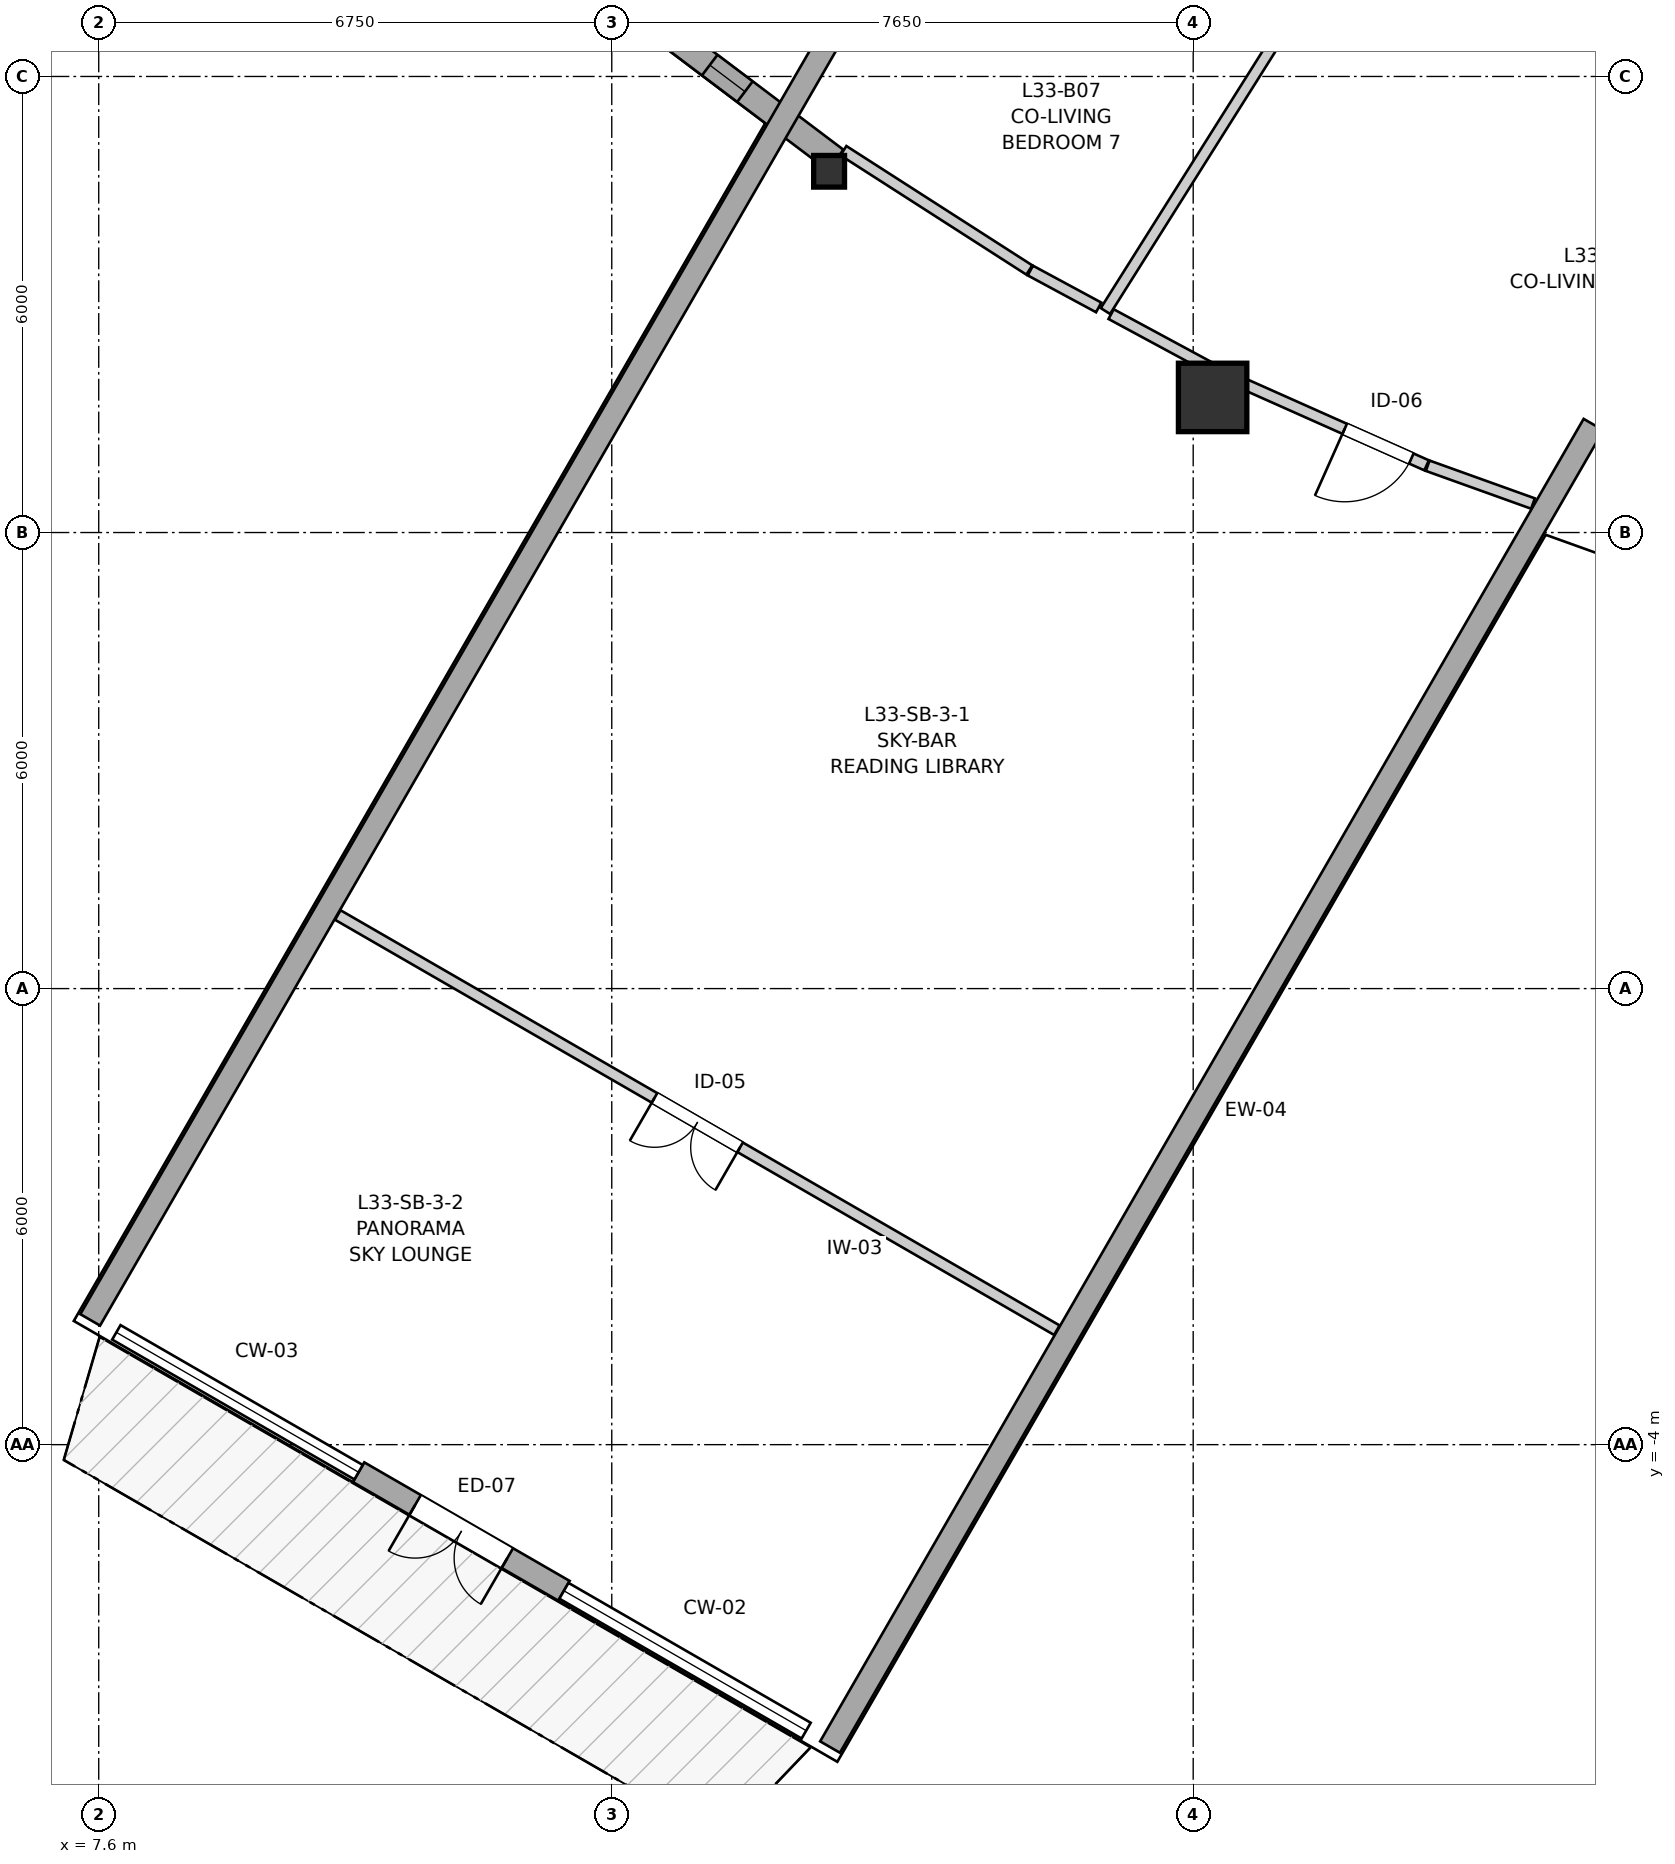
"""IFC4 building model, lengths in metres.
Left out: names, types, materials, properties, quantities, classifications, styles, units other than length and angle.
Written with IfcOpenShell. Run it as: python <this file> out.ifc"""

import sys

from ifc_helpers import new_model, si_unit, direction, frame, frame_2d, origin, origin_2d, place, context, subcontext, project, spatial, rectangle, i_section, extrude, source, transform, mapped, element, fill, save


model = new_model("IFC4")
c1 = context("Model", 3, precision=1e-05, world=origin(), true_north=direction((0.0, 1.0)))
c2 = subcontext(c1, "Body", "Model", "MODEL_VIEW")
j1 = project(units=[si_unit("LENGTHUNIT", "METRE"), si_unit("PLANEANGLEUNIT", "RADIAN")], contexts=[c1])
p1 = place(None, origin())
s1 = spatial("IfcSite", under=j1, at=p1, CompositionType="ELEMENT")
p2 = place(p1, origin())
s2 = spatial("IfcBuilding", under=s1, at=p2, CompositionType="ELEMENT")
p3 = place(p2, frame((0.0, 0.0, 112.0)))
s3 = spatial("IfcBuildingStorey", under=s2, at=p3, CompositionType="ELEMENT", Elevation=112.0)
m1 = source(origin(), c2, "Body", "SweptSolid", [
    extrude(i_section(OverallWidth=0.406, OverallDepth=0.416, WebThickness=0.027, FlangeThickness=0.044, FilletRadius=0.015, at=origin_2d()), origin(), (0.0, 0.0, 1.0), 2.935),
])
p4 = place(p3, frame((17.209, 12.753, 0.0), z_axis=(0.0, 0.0, 1.0), x_axis=(1.0, 0.0, 0.0)))
e1 = element("IfcColumn", 1, at=p4, inside=s3, PredefinedType="PILASTER", context=c2, shape_type="MappedRepresentation", body=[
    mapped(m1, transform((0.0, 0.0, 0.0), x_axis=(1.0, 0.0, 0.0), y_axis=(0.0, 1.0, 0.0), z_axis=(0.0, 0.0, 1.0), scale=1.0)),
])
m2 = source(origin(), c2, "Body", "SweptSolid", [
    extrude(rectangle(XDim=0.9, YDim=0.9, at=origin_2d()), origin(), (0.0, 0.0, 1.0), 2.935),
])
p5 = place(p3, frame((22.256, 9.778, 0.0), z_axis=(0.0, 0.0, 1.0), x_axis=(1.0, 0.0, 0.0)))
e2 = element("IfcColumn", 2, at=p5, inside=s3, PredefinedType="COLUMN", context=c2, shape_type="MappedRepresentation", body=[
    mapped(m2, transform((0.0, 0.0, 0.0), x_axis=(1.0, 0.0, 0.0), y_axis=(0.0, 1.0, 0.0), z_axis=(0.0, 0.0, 1.0), scale=1.0)),
])
p6 = place(p3, frame((14.928, 14.686, 0.0), z_axis=(0.0, 0.0, 1.0), x_axis=(0.798387010211, -0.602144651995, 0.0)))
e3 = element("IfcWall", 3, at=p6, inside=s3, PredefinedType="SOLIDWALL", context=c2, shape_type="SweptSolid", body=[
    extrude(rectangle(XDim=2.966, YDim=0.34, at=frame_2d((1.483, 0.0))), origin(), (0.0, 0.0, 1.0), 2.465),
])
p7 = place(p6, frame((0.891, 0.0, 0.82)))
e4 = element("IfcOpeningElement", 4, at=p7, cuts=e3, PredefinedType="OPENING", context=c2, shape_type="SweptSolid", body=[
    extrude(rectangle(XDim=0.58, YDim=1.35, at=frame_2d((0.29, 0.675))), frame((0.0, 0.18, 0.0), z_axis=(0.0, -1.0, 0.0), x_axis=(1.0, 0.0, 0.0)), (0.0, 0.0, 1.0), 0.36),
])
p8 = place(p3, frame((27.267, 9.42, 0.0), z_axis=(0.0, 0.0, 1.0), x_axis=(-0.500001212782, -0.866024703583, 0.0)))
e5 = element("IfcWall", 5, at=p8, inside=s3, PredefinedType="SOLIDWALL", context=c2, shape_type="SweptSolid", body=[
    extrude(rectangle(XDim=20.09, YDim=0.3, at=frame_2d((10.045, 0.0))), origin(), (0.0, 0.0, 1.0), 2.115),
])
p9 = place(p3, frame((17.533, 15.04, 0.0), z_axis=(0.0, 0.0, 1.0), x_axis=(-0.499995950774, -0.866027741594, 0.0)))
e6 = element("IfcWall", 6, at=p9, inside=s3, PredefinedType="SOLIDWALL", context=c2, shape_type="SweptSolid", body=[
    extrude(rectangle(XDim=20.091, YDim=0.3, at=frame_2d((10.045, 0.0))), origin(), (0.0, 0.0, 1.0), 2.115),
])
p10 = place(p3, frame((13.721, -5.923, 0.0), z_axis=(0.0, 0.0, 1.0), x_axis=(-0.866009661879, 0.500027264788, 0.0)))
e7 = element("IfcWall", 7, at=p10, inside=s3, PredefinedType="SOLIDWALL", context=c2, shape_type="SweptSolid", body=[
    extrude(rectangle(XDim=3.12, YDim=0.3, at=frame_2d((1.56, 0.0))), origin(), (0.0, 0.0, 1.0), 2.3),
])
p11 = place(p10, frame((0.86, 0.0, 0.0)))
e8 = element("IfcOpeningElement", 8, at=p11, cuts=e7, PredefinedType="OPENING", context=c2, shape_type="SweptSolid", body=[
    extrude(rectangle(XDim=1.4, YDim=2.15, at=frame_2d((0.7, 1.075))), frame((0.0, 0.16, 0.0), z_axis=(0.0, -1.0, 0.0), x_axis=(1.0, 0.0, 0.0)), (0.0, 0.0, 1.0), 0.32),
])
p12 = place(p3, frame((20.206, -2.494, 0.0), z_axis=(0.0, 0.0, 1.0), x_axis=(-0.866034115916, 0.499984909842, 0.0)))
e9 = element("IfcWall", 9, at=p12, inside=s3, PredefinedType="PARTITIONING", context=c2, shape_type="SweptSolid", body=[
    extrude(rectangle(XDim=10.924, YDim=0.145, at=frame_2d((5.462, 0.0))), origin(), (0.0, 0.0, 1.0), 2.353),
])
p13 = place(p12, frame((4.812, 0.0, 0.0)))
e10 = element("IfcOpeningElement", 10, at=p13, cuts=e9, PredefinedType="OPENING", context=c2, shape_type="SweptSolid", body=[
    extrude(rectangle(XDim=1.3, YDim=2.1, at=frame_2d((0.65, 1.05))), frame((0.0, 0.083, 0.0), z_axis=(0.0, -1.0, 0.0), x_axis=(1.0, 0.0, 0.0)), (0.0, 0.0, 1.0), 0.165),
])
p14 = place(p3, frame((25.071, 8.884, 0.0), z_axis=(0.0, 0.0, 1.0), x_axis=(-0.913404708383, 0.407052623997, 0.0)))
e11 = element("IfcWall", 11, at=p14, inside=s3, PredefinedType="PARTITIONING", context=c2, shape_type="SweptSolid", body=[
    extrude(rectangle(XDim=2.923, YDim=0.145, at=frame_2d((1.462, 0.0))), origin(), (0.0, 0.0, 1.0), 2.453),
])
p15 = place(p14, frame((0.22, 0.0, 0.0)))
e12 = element("IfcOpeningElement", 12, at=p15, cuts=e11, PredefinedType="OPENING", context=c2, shape_type="SweptSolid", body=[
    extrude(rectangle(XDim=0.96, YDim=2.1, at=frame_2d((0.48, 1.05))), frame((0.0, 0.083, 0.0), z_axis=(0.0, -1.0, 0.0), x_axis=(1.0, 0.0, 0.0)), (0.0, 0.0, 1.0), 0.165),
])
p16 = place(p3, frame((20.845, 10.914, 0.0), z_axis=(0.0, 0.0, 1.0), x_axis=(0.533007953382, 0.846110230189, 0.0)))
e13 = element("IfcWall", 13, at=p16, inside=s3, PredefinedType="PARTITIONING", context=c2, shape_type="SweptSolid", body=[
    extrude(rectangle(XDim=5.354, YDim=0.145, at=frame_2d((2.677, 0.0))), origin(), (0.0, 0.0, 1.0), 2.935),
])
p17 = place(p3, frame((17.398, 13.024, 0.0), z_axis=(0.0, 0.0, 1.0), x_axis=(0.841590343852, -0.540116369994, 0.0)))
e14 = element("IfcWall", 14, at=p17, inside=s3, PredefinedType="PARTITIONING", context=c2, shape_type="SweptSolid", body=[
    extrude(rectangle(XDim=2.906, YDim=0.145, at=frame_2d((1.453, 0.0))), origin(), (0.0, 0.0, 1.0), 2.453),
])
p18 = place(p3, frame((20.92, 10.873, 0.0), z_axis=(0.0, 0.0, 1.0), x_axis=(0.879929881444, -0.475103571595, 0.0)))
e15 = element("IfcWall", 15, at=p18, inside=s3, PredefinedType="PARTITIONING", context=c2, shape_type="SweptSolid", body=[
    extrude(rectangle(XDim=1.667, YDim=0.145, at=frame_2d((0.834, 0.0))), origin(), (0.0, 0.0, 1.0), 2.453),
])
p19 = place(p3, frame((25.085, 8.879, 0.0), z_axis=(0.0, 0.0, 1.0), x_axis=(0.941166260093, -0.337943887151, 0.0)))
e16 = element("IfcWall", 16, at=p19, inside=s3, PredefinedType="PARTITIONING", context=c2, shape_type="SweptSolid", body=[
    extrude(rectangle(XDim=1.472, YDim=0.145, at=frame_2d((0.736, 0.0))), origin(), (0.0, 0.0, 1.0), 2.453),
])
p20 = place(p3, frame((19.857, 11.447, 0.0), z_axis=(0.0, 0.0, 1.0), x_axis=(0.8800411893, -0.474897362738, 0.0)))
e17 = element("IfcWall", 17, at=p20, inside=s3, PredefinedType="PARTITIONING", context=c2, shape_type="SweptSolid", body=[
    extrude(rectangle(XDim=1.022, YDim=0.145, at=frame_2d((0.511, 0.0))), origin(), (0.0, 0.0, 1.0), 2.453),
])
m3 = source(origin(), c2, "Body", "SweptSolid", [
    extrude(rectangle(XDim=0.58, YDim=1.35, at=frame_2d((0.29, 0.675))), frame((0.0, 0.03, 0.0), z_axis=(0.0, -1.0, 0.0), x_axis=(1.0, 0.0, 0.0)), (0.0, 0.0, 1.0), 0.06),
])
p21 = place(p7, origin())
e18 = element("IfcWindow", 18, at=p21, inside=s3, PartitioningType="SINGLE_PANEL", PredefinedType="WINDOW", context=c2, shape_type="MappedRepresentation", body=[
    mapped(m3, transform((0.0, 0.0, 0.0), x_axis=(1.0, 0.0, 0.0), y_axis=(0.0, 1.0, 0.0), z_axis=(0.0, 0.0, 1.0), scale=1.0)),
])
fill(e4, e18)
m4 = source(origin(), c2, "Body", "SweptSolid", [
    extrude(rectangle(XDim=1.4, YDim=2.15, at=frame_2d((0.7, 1.075))), frame((0.0, 0.025, 0.0), z_axis=(0.0, -1.0, 0.0), x_axis=(1.0, 0.0, 0.0)), (0.0, 0.0, 1.0), 0.05),
])
p22 = place(p11, origin())
e19 = element("IfcDoor", 19, at=p22, inside=s3, OperationType="DOUBLE_DOOR_SINGLE_SWING", PredefinedType="DOOR", context=c2, shape_type="MappedRepresentation", body=[
    mapped(m4, transform((0.0, 0.0, 0.0), x_axis=(1.0, 0.0, 0.0), y_axis=(0.0, 1.0, 0.0), z_axis=(0.0, 0.0, 1.0), scale=1.0)),
])
fill(e8, e19)
m5 = source(origin(), c2, "Body", "SweptSolid", [
    extrude(rectangle(XDim=1.3, YDim=2.1, at=frame_2d((0.65, 1.05))), frame((0.0, 0.025, 0.0), z_axis=(0.0, -1.0, 0.0), x_axis=(1.0, 0.0, 0.0)), (0.0, 0.0, 1.0), 0.05),
])
p23 = place(p13, origin())
e20 = element("IfcDoor", 20, at=p23, inside=s3, OperationType="DOUBLE_DOOR_SINGLE_SWING", PredefinedType="DOOR", context=c2, shape_type="MappedRepresentation", body=[
    mapped(m5, transform((0.0, 0.0, 0.0), x_axis=(1.0, 0.0, 0.0), y_axis=(0.0, 1.0, 0.0), z_axis=(0.0, 0.0, 1.0), scale=1.0)),
])
fill(e10, e20)
m6 = source(origin(), c2, "Body", "SweptSolid", [
    extrude(rectangle(XDim=0.96, YDim=2.1, at=frame_2d((0.48, 1.05))), frame((0.0, 0.025, 0.0), z_axis=(0.0, -1.0, 0.0), x_axis=(1.0, 0.0, 0.0)), (0.0, 0.0, 1.0), 0.05),
])
p24 = place(p15, origin())
e21 = element("IfcDoor", 21, at=p24, inside=s3, OperationType="SINGLE_SWING_RIGHT", PredefinedType="DOOR", context=c2, shape_type="MappedRepresentation", body=[
    mapped(m6, transform((0.0, 0.0, 0.0), x_axis=(1.0, 0.0, 0.0), y_axis=(0.0, 1.0, 0.0), z_axis=(0.0, 0.0, 1.0), scale=1.0)),
])
fill(e12, e21)
save(model, sys.argv[1])
